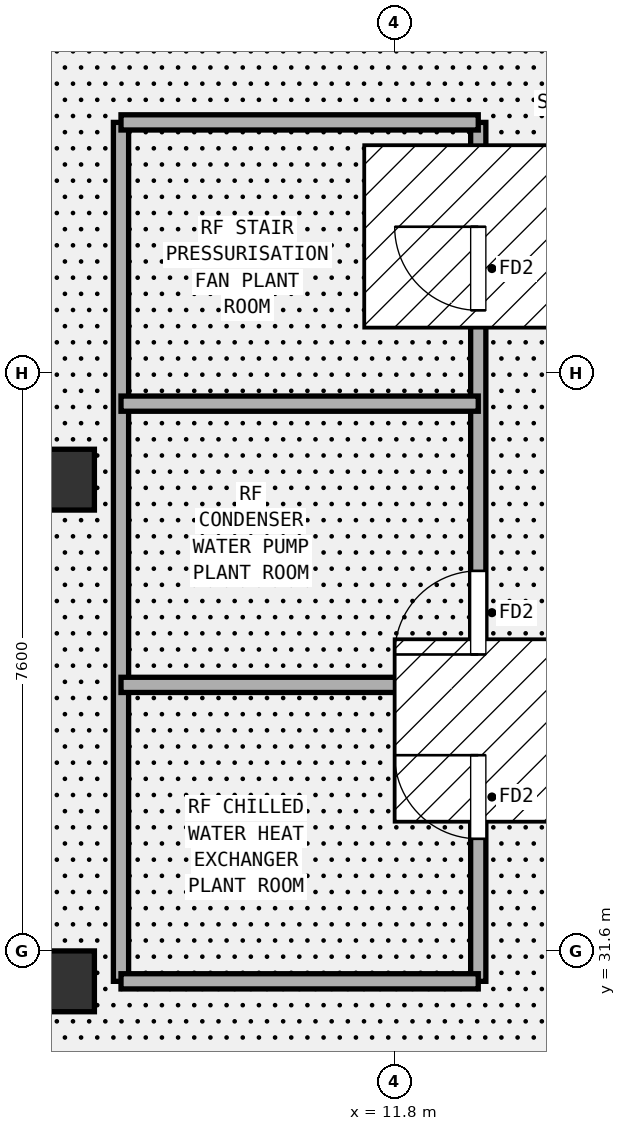
"""IFC4 building model, lengths in metres.
Left out: names, types, materials, properties, quantities, classifications, styles, units other than length and angle.
Written with IfcOpenShell. Run it as: python <this file> out.ifc"""

import sys

from ifc_helpers import new_model, si_unit, direction, frame, frame_2d, origin, origin_2d, place, context, subcontext, project, spatial, rectangle, extrude, element, fill, save


model = new_model("IFC4")
c1 = context("Model", 3, precision=1e-05, world=origin(), true_north=direction((0.0, 1.0)))
c2 = subcontext(c1, "Body", "Model", "MODEL_VIEW")
j1 = project(units=[si_unit("LENGTHUNIT", "METRE"), si_unit("PLANEANGLEUNIT", "RADIAN")], contexts=[c1])
p1 = place(None, origin())
s1 = spatial("IfcSite", under=j1, at=p1, CompositionType="ELEMENT")
p2 = place(p1, origin())
s2 = spatial("IfcBuilding", under=s1, at=p2, CompositionType="ELEMENT")
p3 = place(p2, frame((0.0, 0.0, 360.4)))
s3 = spatial("IfcBuildingStorey", under=s2, at=p3, CompositionType="ELEMENT", Elevation=360.4)
for number, where, z_axis, x_axis in (
    (1, (7.45, 31.2, 0.0), (0.0, 0.0, 1.0), (1.0, 0.0, 0.0)),
    (2, (7.45, 37.8, 0.0), (0.0, 0.0, 1.0), (1.0, 0.0, 0.0)),
):
    element("IfcColumn", number, at=place(p3, frame(where, z_axis=z_axis, x_axis=x_axis)), inside=s3, PredefinedType="COLUMN", context=c2, shape_type="SweptSolid", body=[
        extrude(rectangle(XDim=0.8, YDim=0.8, at=origin_2d()), origin(), (0.0, 0.0, 1.0), 4.531),
    ])
p4 = place(p3, frame((12.9, 31.2, 0.0), z_axis=(0.0, 0.0, 1.0), x_axis=(0.0, 1.0, 0.0)))
e3 = element("IfcWall", 3, at=p4, inside=s3, PredefinedType="PARTITIONING", context=c2, shape_type="SweptSolid", body=[
    extrude(rectangle(XDim=11.3, YDim=0.2, at=frame_2d((5.65, 0.0))), origin(), (0.0, 0.0, 1.0), 4.48),
])
p5 = place(p4, frame((1.875, 0.0, 0.0)))
e4 = element("IfcOpeningElement", 4, at=p5, cuts=e3, PredefinedType="OPENING", context=c2, shape_type="SweptSolid", body=[
    extrude(rectangle(XDim=1.1, YDim=2.2, at=frame_2d((0.55, 1.1))), frame((0.0, 0.11, 0.0), z_axis=(0.0, -1.0, 0.0), x_axis=(1.0, 0.0, 0.0)), (0.0, 0.0, 1.0), 0.22),
])
p6 = place(p4, frame((4.3, 0.0, 0.0)))
e5 = element("IfcOpeningElement", 5, at=p6, cuts=e3, PredefinedType="OPENING", context=c2, shape_type="SweptSolid", body=[
    extrude(rectangle(XDim=1.1, YDim=2.2, at=frame_2d((0.55, 1.1))), frame((0.0, 0.11, 0.0), z_axis=(0.0, -1.0, 0.0), x_axis=(1.0, 0.0, 0.0)), (0.0, 0.0, 1.0), 0.22),
])
p7 = place(p4, frame((8.827, 0.0, 0.0)))
e6 = element("IfcOpeningElement", 6, at=p7, cuts=e3, PredefinedType="OPENING", context=c2, shape_type="SweptSolid", body=[
    extrude(rectangle(XDim=1.1, YDim=2.2, at=frame_2d((0.55, 1.1))), frame((0.0, 0.11, 0.0), z_axis=(0.0, -1.0, 0.0), x_axis=(1.0, 0.0, 0.0)), (0.0, 0.0, 1.0), 0.22),
])
p8 = place(p3, frame((8.2, 31.2, 0.0), z_axis=(0.0, 0.0, 1.0), x_axis=(0.0, 1.0, 0.0)))
e7 = element("IfcWall", 7, at=p8, inside=s3, PredefinedType="PARTITIONING", context=c2, shape_type="SweptSolid", body=[
    extrude(rectangle(XDim=11.3, YDim=0.2, at=frame_2d((5.65, 0.0))), origin(), (0.0, 0.0, 1.0), 4.48),
])
p9 = place(p3, frame((8.2, 31.2, 0.0), z_axis=(0.0, 0.0, 1.0), x_axis=(1.0, 0.0, 0.0)))
e8 = element("IfcWall", 8, at=p9, inside=s3, PredefinedType="PARTITIONING", context=c2, shape_type="SweptSolid", body=[
    extrude(rectangle(XDim=4.7, YDim=0.2, at=frame_2d((2.35, 0.0))), origin(), (0.0, 0.0, 1.0), 4.031),
])
for number, where, z_axis, x_axis in (
    (9, (8.2, 42.5, 0.0), (0.0, 0.0, 1.0), (1.0, 0.0, 0.0)),
    (10, (8.2, 35.1, 0.0), (0.0, 0.0, 1.0), (1.0, 0.0, 0.0)),
    (11, (8.2, 38.8, 0.0), (0.0, 0.0, 1.0), (1.0, 0.0, 0.0)),
):
    element("IfcWall", number, at=place(p3, frame(where, z_axis=z_axis, x_axis=x_axis)), inside=s3, PredefinedType="PARTITIONING", context=c2, shape_type="SweptSolid", body=[
        extrude(rectangle(XDim=4.7, YDim=0.2, at=frame_2d((2.35, 0.0))), origin(), (0.0, 0.0, 1.0), 4.48),
    ])
p10 = place(p3, frame((6.8, 4.0, 4.799), z_axis=(-0.019179722964, -9.68549e-07, 0.999816052195), x_axis=(0.999816052195, -8e-12, 0.019179722964)))
p11 = place(p10, frame((6.201, 30.5, 0.0)))
p12 = place(p11, frame((0.0, 0.0, -0.05)))
e12 = element("IfcWindow", 12, at=p12, inside=s3, PartitioningType="SINGLE_PANEL", PredefinedType="SKYLIGHT", context=c2, shape_type="SweptSolid", body=[
    extrude(rectangle(XDim=2.4, YDim=2.4, at=origin_2d()), origin(), (0.0, 0.0, 1.0), 0.05),
])
p13 = place(p10, frame((6.201, 37.0, 0.0)))
p14 = place(p13, frame((0.0, 0.0, -0.05)))
e13 = element("IfcWindow", 13, at=p14, inside=s3, PartitioningType="SINGLE_PANEL", PredefinedType="SKYLIGHT", context=c2, shape_type="SweptSolid", body=[
    extrude(rectangle(XDim=3.2, YDim=2.4, at=origin_2d()), origin(), (0.0, 0.0, 1.0), 0.05),
])
p15 = place(p5, origin())
e14 = element("IfcDoor", 14, at=p15, inside=s3, OperationType="SINGLE_SWING_RIGHT", PredefinedType="DOOR", context=c2, shape_type="SweptSolid", body=[
    extrude(rectangle(XDim=1.1, YDim=2.2, at=frame_2d((0.55, 1.1))), frame((0.0, 0.025, 0.0), z_axis=(0.0, -1.0, 0.0), x_axis=(1.0, 0.0, 0.0)), (0.0, 0.0, 1.0), 0.05),
])
fill(e4, e14)
p16 = place(p6, origin())
e15 = element("IfcDoor", 15, at=p16, inside=s3, OperationType="SINGLE_SWING_LEFT", PredefinedType="DOOR", context=c2, shape_type="SweptSolid", body=[
    extrude(rectangle(XDim=1.1, YDim=2.2, at=frame_2d((0.55, 1.1))), frame((0.0, 0.025, 0.0), z_axis=(0.0, -1.0, 0.0), x_axis=(1.0, 0.0, 0.0)), (0.0, 0.0, 1.0), 0.05),
])
fill(e5, e15)
p17 = place(p7, origin())
e16 = element("IfcDoor", 16, at=p17, inside=s3, OperationType="SINGLE_SWING_RIGHT", PredefinedType="DOOR", context=c2, shape_type="SweptSolid", body=[
    extrude(rectangle(XDim=1.1, YDim=2.2, at=frame_2d((0.55, 1.1))), frame((0.0, 0.025, 0.0), z_axis=(0.0, -1.0, 0.0), x_axis=(1.0, 0.0, 0.0)), (0.0, 0.0, 1.0), 0.05),
])
fill(e6, e16)
save(model, sys.argv[1])
